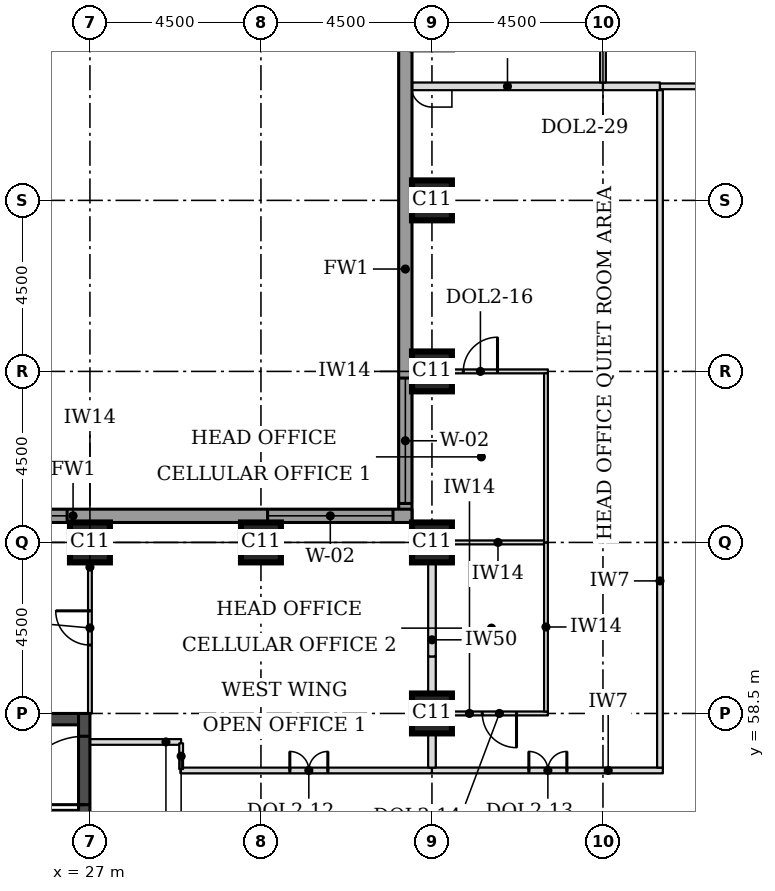
"""IFC4 building model, lengths in metres.
Left out: names, types, materials, properties, quantities, classifications, styles, units other than length and angle.
Written with IfcOpenShell. Run it as: python <this file> out.ifc"""

import sys

from ifc_helpers import new_model, si_unit, direction, frame, frame_2d, origin, origin_2d, place, context, subcontext, project, spatial, rectangle, extrude, element, fill, save


model = new_model("IFC4")
c1 = context("Model", 3, precision=1e-05, world=origin(), true_north=direction((0.0, 1.0)))
c2 = subcontext(c1, "Body", "Model", "MODEL_VIEW")
j1 = project(units=[si_unit("LENGTHUNIT", "METRE"), si_unit("PLANEANGLEUNIT", "RADIAN")], contexts=[c1])
p1 = place(None, origin())
s1 = spatial("IfcSite", under=j1, at=p1, CompositionType="ELEMENT")
p2 = place(p1, origin())
s2 = spatial("IfcBuilding", under=s1, at=p2, CompositionType="ELEMENT")
p3 = place(p2, frame((0.0, 0.0, 86.3)))
s3 = spatial("IfcBuildingStorey", under=s2, at=p3, CompositionType="ELEMENT", Elevation=86.3)
for number, where, z_axis, x_axis in (
    (1, (36.0, 58.5, 0.0), (0.0, 0.0, 1.0), (1.0, 0.0, 0.0)),
    (2, (27.0, 63.0, 0.0), (0.0, 0.0, 1.0), (1.0, 0.0, 0.0)),
    (3, (31.5, 63.0, 0.0), (0.0, 0.0, 1.0), (1.0, 0.0, 0.0)),
    (4, (36.0, 63.0, 0.0), (0.0, 0.0, 1.0), (1.0, 0.0, 0.0)),
    (5, (36.0, 67.5, 0.0), (0.0, 0.0, 1.0), (1.0, 0.0, 0.0)),
    (6, (36.0, 72.0, 0.0), (0.0, 0.0, 1.0), (1.0, 0.0, 0.0)),
):
    element("IfcColumn", number, at=place(p3, frame(where, z_axis=z_axis, x_axis=x_axis)), inside=s3, PredefinedType="COLUMN", context=c2, shape_type="SweptSolid", body=[
        extrude(rectangle(XDim=1.05, YDim=1.05, at=origin_2d()), origin(), (0.0, 0.0, 1.0), 3.7),
    ])
p4 = place(p3, frame((18.3, 58.35, 0.0), z_axis=(0.0, 0.0, 1.0), x_axis=(1.0, 0.0, 0.0)))
e7 = element("IfcWall", 7, at=p4, inside=s3, PredefinedType="SHEAR", context=c2, shape_type="SweptSolid", body=[
    extrude(rectangle(XDim=8.4, YDim=0.3, at=frame_2d((4.2, 0.0))), origin(), (0.0, 0.0, 1.0), 3.7),
])
p5 = place(p3, frame((26.85, 49.5, 0.0), z_axis=(0.0, 0.0, 1.0), x_axis=(0.0, 1.0, 0.0)))
e8 = element("IfcWall", 8, at=p5, inside=s3, PredefinedType="SHEAR", context=c2, shape_type="SweptSolid", body=[
    extrude(rectangle(XDim=9.0, YDim=0.3, at=frame_2d((4.5, 0.0))), origin(), (0.0, 0.0, 1.0), 3.7),
])
p6 = place(p5, frame((6.6, 0.0, 0.0)))
e9 = element("IfcOpeningElement", 9, at=p6, cuts=e8, PredefinedType="OPENING", context=c2, shape_type="SweptSolid", body=[
    extrude(rectangle(XDim=1.8, YDim=2.1, at=frame_2d((0.9, 1.05))), frame((0.0, 0.16, 0.0), z_axis=(0.0, -1.0, 0.0), x_axis=(1.0, 0.0, 0.0)), (0.0, 0.0, 1.0), 0.32),
])
p7 = place(p3, frame((35.3, 76.862, 0.0), z_axis=(0.0, 0.0, 1.0), x_axis=(0.0, -1.0, 0.0)))
e10 = element("IfcWall", 10, at=p7, inside=s3, PredefinedType="STANDARD", context=c2, shape_type="SweptSolid", body=[
    extrude(rectangle(XDim=13.337, YDim=0.35, at=frame_2d((6.669, 0.0))), origin(), (0.0, 0.0, 1.0), 3.525),
])
p8 = place(p7, frame((9.537, 0.0, 0.9)))
e11 = element("IfcOpeningElement", 11, at=p8, cuts=e10, PredefinedType="OPENING", context=c2, shape_type="SweptSolid", body=[
    extrude(rectangle(XDim=3.3, YDim=1.9, at=frame_2d((1.65, 0.95))), frame((0.0, 0.185, 0.0), z_axis=(0.0, -1.0, 0.0), x_axis=(1.0, 0.0, 0.0)), (0.0, 0.0, 1.0), 0.37),
])
p9 = place(p3, frame((35.475, 63.7, 0.0), z_axis=(0.0, 0.0, 1.0), x_axis=(-1.0, 0.0, 0.0)))
e12 = element("IfcWall", 12, at=p9, inside=s3, PredefinedType="STANDARD", context=c2, shape_type="SweptSolid", body=[
    extrude(rectangle(XDim=17.837, YDim=0.35, at=frame_2d((8.919, 0.0))), origin(), (0.0, 0.0, 1.0), 3.525),
])
p10 = place(p9, frame((0.5, 0.0, 0.9)))
e13 = element("IfcOpeningElement", 13, at=p10, cuts=e12, PredefinedType="OPENING", context=c2, shape_type="SweptSolid", body=[
    extrude(rectangle(XDim=3.3, YDim=1.9, at=frame_2d((1.65, 0.95))), frame((0.0, 0.185, 0.0), z_axis=(0.0, -1.0, 0.0), x_axis=(1.0, 0.0, 0.0)), (0.0, 0.0, 1.0), 0.37),
])
p11 = place(p9, frame((9.075, 0.0, 0.9)))
e14 = element("IfcOpeningElement", 14, at=p11, cuts=e12, PredefinedType="OPENING", context=c2, shape_type="SweptSolid", body=[
    extrude(rectangle(XDim=3.3, YDim=1.9, at=frame_2d((1.65, 0.95))), frame((0.0, 0.185, 0.0), z_axis=(0.0, -1.0, 0.0), x_axis=(1.0, 0.0, 0.0)), (0.0, 0.0, 1.0), 0.37),
])
p12 = place(p3, frame((29.38, 57.0, 0.0), z_axis=(0.0, 0.0, 1.0), x_axis=(1.0, 0.0, 0.0)))
e15 = element("IfcWall", 15, at=p12, inside=s3, PredefinedType="PARTITIONING", context=c2, shape_type="SweptSolid", body=[
    extrude(rectangle(XDim=6.62, YDim=0.15, at=frame_2d((3.31, 0.0))), origin(), (0.0, 0.0, 1.0), 3.55),
])
p13 = place(p12, frame((2.88, 0.0, 0.0)))
e16 = element("IfcOpeningElement", 16, at=p13, cuts=e15, PredefinedType="OPENING", context=c2, shape_type="SweptSolid", body=[
    extrude(rectangle(XDim=1.0, YDim=2.1, at=frame_2d((0.5, 1.05))), frame((0.0, 0.085, 0.0), z_axis=(0.0, -1.0, 0.0), x_axis=(1.0, 0.0, 0.0)), (0.0, 0.0, 1.0), 0.17),
])
p14 = place(p3, frame((36.0, 57.0, 0.0), z_axis=(0.0, 0.0, 1.0), x_axis=(1.0, 0.0, 0.0)))
e17 = element("IfcWall", 17, at=p14, inside=s3, PredefinedType="PARTITIONING", context=c2, shape_type="SweptSolid", body=[
    extrude(rectangle(XDim=6.075, YDim=0.15, at=frame_2d((3.038, 0.0))), origin(), (0.0, 0.0, 1.0), 3.55),
])
p15 = place(p14, frame((2.55, 0.0, 0.0)))
e18 = element("IfcOpeningElement", 18, at=p15, cuts=e17, PredefinedType="OPENING", context=c2, shape_type="SweptSolid", body=[
    extrude(rectangle(XDim=1.0, YDim=2.1, at=frame_2d((0.5, 1.05))), frame((0.0, 0.085, 0.0), z_axis=(0.0, -1.0, 0.0), x_axis=(1.0, 0.0, 0.0)), (0.0, 0.0, 1.0), 0.17),
])
p16 = place(p3, frame((36.525, 58.5, 0.0), z_axis=(0.0, 0.0, 1.0), x_axis=(1.0, 0.0, 0.0)))
e19 = element("IfcWall", 19, at=p16, inside=s3, PredefinedType="PARTITIONING", context=c2, shape_type="SweptSolid", body=[
    extrude(rectangle(XDim=2.525, YDim=0.1, at=frame_2d((1.263, 0.0))), origin(), (0.0, 0.0, 1.0), 3.55),
])
p17 = place(p16, frame((0.8, 0.0, 0.0)))
e20 = element("IfcOpeningElement", 20, at=p17, cuts=e19, PredefinedType="OPENING", context=c2, shape_type="SweptSolid", body=[
    extrude(rectangle(XDim=0.9, YDim=2.1, at=frame_2d((0.45, 1.05))), frame((0.0, 0.06, 0.0), z_axis=(0.0, -1.0, 0.0), x_axis=(1.0, 0.0, 0.0)), (0.0, 0.0, 1.0), 0.12),
])
p18 = place(p3, frame((36.525, 63.0, 0.0), z_axis=(0.0, 0.0, 1.0), x_axis=(1.0, 0.0, 0.0)))
e21 = element("IfcWall", 21, at=p18, inside=s3, PredefinedType="PARTITIONING", context=c2, shape_type="SweptSolid", body=[
    extrude(rectangle(XDim=2.425, YDim=0.1, at=frame_2d((1.212, 0.0))), origin(), (0.0, 0.0, 1.0), 3.55),
])
p19 = place(p3, frame((35.475, 67.5, 0.0), z_axis=(0.0, 0.0, 1.0), x_axis=(1.0, 0.0, 0.0)))
e22 = element("IfcWall", 22, at=p19, inside=s3, PredefinedType="PARTITIONING", context=c2, shape_type="SweptSolid", body=[
    extrude(rectangle(XDim=3.575, YDim=0.1, at=frame_2d((1.788, 0.0))), origin(), (0.0, 0.0, 1.0), 3.55),
])
p20 = place(p19, frame((1.35, 0.0, 0.0)))
e23 = element("IfcOpeningElement", 23, at=p20, cuts=e22, PredefinedType="OPENING", context=c2, shape_type="SweptSolid", body=[
    extrude(rectangle(XDim=0.9, YDim=2.1, at=frame_2d((0.45, 1.05))), frame((0.0, 0.06, 0.0), z_axis=(0.0, -1.0, 0.0), x_axis=(1.0, 0.0, 0.0)), (0.0, 0.0, 1.0), 0.12),
])
p21 = place(p3, frame((35.475, 75.0, 0.0), z_axis=(0.0, 0.0, 1.0), x_axis=(1.0, 0.0, 0.0)))
e24 = element("IfcWall", 24, at=p21, inside=s3, PredefinedType="PARTITIONING", context=c2, shape_type="SweptSolid", body=[
    extrude(rectangle(XDim=5.025, YDim=0.2, at=frame_2d((2.512, 0.0))), origin(), (0.0, 0.0, 1.0), 3.55),
])
p22 = place(p3, frame((40.5, 75.0, 0.0), z_axis=(0.0, 0.0, 1.0), x_axis=(1.0, 0.0, 0.0)))
e25 = element("IfcWall", 25, at=p22, inside=s3, PredefinedType="PARTITIONING", context=c2, shape_type="SweptSolid", body=[
    extrude(rectangle(XDim=1.5, YDim=0.2, at=frame_2d((0.75, 0.0))), origin(), (0.0, 0.0, 1.0), 3.55),
])
p23 = place(p3, frame((42.0, 75.0, 0.0), z_axis=(0.0, 0.0, 1.0), x_axis=(1.0, 0.0, 0.0)))
e26 = element("IfcWall", 26, at=p23, inside=s3, PredefinedType="PARTITIONING", context=c2, shape_type="SweptSolid", body=[
    extrude(rectangle(XDim=4.5, YDim=0.15, at=frame_2d((2.25, 0.0))), origin(), (0.0, 0.0, 1.0), 3.55),
])
p24 = place(p23, frame((1.75, 0.0, 0.0)))
e27 = element("IfcOpeningElement", 27, at=p24, cuts=e26, PredefinedType="OPENING", context=c2, shape_type="SweptSolid", body=[
    extrude(rectangle(XDim=1.0, YDim=2.1, at=frame_2d((0.5, 1.05))), frame((0.0, 0.085, 0.0), z_axis=(0.0, -1.0, 0.0), x_axis=(1.0, 0.0, 0.0)), (0.0, 0.0, 1.0), 0.17),
])
p25 = place(p3, frame((36.0, 57.075, 0.0), z_axis=(0.0, 0.0, 1.0), x_axis=(0.0, 1.0, 0.0)))
e28 = element("IfcWall", 28, at=p25, inside=s3, PredefinedType="PARTITIONING", context=c2, shape_type="SweptSolid", body=[
    extrude(rectangle(XDim=0.9, YDim=0.2, at=frame_2d((0.45, 0.0))), origin(), (0.0, 0.0, 1.0), 2.8),
])
p26 = place(p3, frame((42.0, 57.075, 0.0), z_axis=(0.0, 0.0, 1.0), x_axis=(0.0, 1.0, 0.0)))
e29 = element("IfcWall", 29, at=p26, inside=s3, PredefinedType="PARTITIONING", context=c2, shape_type="SweptSolid", body=[
    extrude(rectangle(XDim=17.825, YDim=0.15, at=frame_2d((8.913, 0.0))), origin(), (0.0, 0.0, 1.0), 3.55),
])
p27 = place(p3, frame((39.0, 58.55, 0.0), z_axis=(0.0, 0.0, 1.0), x_axis=(0.0, 1.0, 0.0)))
e30 = element("IfcWall", 30, at=p27, inside=s3, PredefinedType="PARTITIONING", context=c2, shape_type="SweptSolid", body=[
    extrude(rectangle(XDim=4.45, YDim=0.1, at=frame_2d((2.225, 0.0))), origin(), (0.0, 0.0, 1.0), 3.55),
])
p28 = place(p3, frame((36.0, 58.995, 0.0), z_axis=(0.0, 0.0, 1.0), x_axis=(0.0, 1.0, 0.0)))
e31 = element("IfcWall", 31, at=p28, inside=s3, PredefinedType="PARTITIONING", context=c2, shape_type="SweptSolid", body=[
    extrude(rectangle(XDim=1.005, YDim=0.2, at=frame_2d((0.502, 0.0))), origin(), (0.0, 0.0, 1.0), 2.8),
])
p29 = place(p3, frame((36.0, 60.0, 0.0), z_axis=(0.0, 0.0, 1.0), x_axis=(0.0, 1.0, 0.0)))
e32 = element("IfcWall", 32, at=p29, inside=s3, PredefinedType="PARTITIONING", context=c2, shape_type="SweptSolid", body=[
    extrude(rectangle(XDim=2.475, YDim=0.2, at=frame_2d((1.238, 0.0))), origin(), (0.0, 0.0, 1.0), 2.8),
])
p30 = place(p3, frame((39.0, 63.0, 0.0), z_axis=(0.0, 0.0, 1.0), x_axis=(0.0, 1.0, 0.0)))
e33 = element("IfcWall", 33, at=p30, inside=s3, PredefinedType="PARTITIONING", context=c2, shape_type="SweptSolid", body=[
    extrude(rectangle(XDim=4.45, YDim=0.1, at=frame_2d((2.225, 0.0))), origin(), (0.0, 0.0, 1.0), 3.55),
])
p31 = place(p3, frame((40.5, 75.1, 0.0), z_axis=(0.0, 0.0, 1.0), x_axis=(0.0, 1.0, 0.0)))
e34 = element("IfcWall", 34, at=p31, inside=s3, PredefinedType="PARTITIONING", context=c2, shape_type="SweptSolid", body=[
    extrude(rectangle(XDim=2.9, YDim=0.15, at=frame_2d((1.45, 0.0))), origin(), (0.0, 0.0, 1.0), 3.55),
])
p32 = place(p31, frame((1.0, 0.0, 0.0)))
e35 = element("IfcOpeningElement", 35, at=p32, cuts=e34, PredefinedType="OPENING", context=c2, shape_type="SweptSolid", body=[
    extrude(rectangle(XDim=0.9, YDim=2.1, at=frame_2d((0.45, 1.05))), frame((0.0, 0.085, 0.0), z_axis=(0.0, -1.0, 0.0), x_axis=(1.0, 0.0, 0.0)), (0.0, 0.0, 1.0), 0.17),
])
p33 = place(p3, frame((27.0, 63.0, 0.0), z_axis=(0.0, 0.0, 1.0), x_axis=(0.0, -1.0, 0.0)))
e36 = element("IfcWall", 36, at=p33, inside=s3, PredefinedType="PARTITIONING", context=c2, shape_type="SweptSolid", body=[
    extrude(rectangle(XDim=4.5, YDim=0.1, at=frame_2d((2.25, 0.0))), origin(), (0.0, 0.0, 1.0), 3.55),
])
p34 = place(p33, frame((1.8, 0.0, 0.0)))
e37 = element("IfcOpeningElement", 37, at=p34, cuts=e36, PredefinedType="OPENING", context=c2, shape_type="SweptSolid", body=[
    extrude(rectangle(XDim=0.9, YDim=2.1, at=frame_2d((0.45, 1.05))), frame((0.0, 0.06, 0.0), z_axis=(0.0, -1.0, 0.0), x_axis=(1.0, 0.0, 0.0)), (0.0, 0.0, 1.0), 0.12),
])
p35 = place(p3, frame((27.0, 57.75, 0.0), z_axis=(0.0, 0.0, 1.0), x_axis=(1.0, 0.0, 0.0)))
e38 = element("IfcWall", 38, at=p35, inside=s3, PredefinedType="PARTITIONING", context=c2, shape_type="SweptSolid", body=[
    extrude(rectangle(XDim=2.4, YDim=0.15, at=frame_2d((1.2, 0.0))), origin(), (0.0, 0.0, 1.0), 3.55),
])
p36 = place(p3, frame((29.4, 57.715, 0.0), z_axis=(0.0, 0.0, 1.0), x_axis=(0.0, -1.0, 0.0)))
e39 = element("IfcWall", 39, at=p36, inside=s3, PredefinedType="PARTITIONING", context=c2, shape_type="SweptSolid", body=[
    extrude(rectangle(XDim=0.68, YDim=0.1, at=frame_2d((0.34, 0.0))), origin(), (0.0, 0.0, 1.0), 3.55),
])
p37 = place(p3, frame((23.2, 55.85, 0.0), z_axis=(0.0, 0.0, 1.0), x_axis=(1.0, 0.0, 0.0)))
e40 = element("IfcWall", 40, at=p37, inside=s3, PredefinedType="SOLIDWALL", context=c2, shape_type="SweptSolid", body=[
    extrude(rectangle(XDim=3.5, YDim=0.2, at=frame_2d((1.75, 0.0))), origin(), (0.0, 0.0, 1.0), 3.55),
])
p38 = place(p37, frame((1.2, 0.0, 0.0)))
e41 = element("IfcOpeningElement", 41, at=p38, cuts=e40, PredefinedType="OPENING", context=c2, shape_type="SweptSolid", body=[
    extrude(rectangle(XDim=1.1, YDim=2.1, at=frame_2d((0.55, 1.05))), frame((0.0, 0.11, 0.0), z_axis=(0.0, -1.0, 0.0), x_axis=(1.0, 0.0, 0.0)), (0.0, 0.0, 1.0), 0.22),
])
p39 = place(p8, origin())
e42 = element("IfcWindow", 42, at=p39, inside=s3, PartitioningType="SINGLE_PANEL", PredefinedType="WINDOW", context=c2, shape_type="SweptSolid", body=[
    extrude(rectangle(XDim=3.3, YDim=1.9, at=frame_2d((1.65, 0.95))), frame((0.0, 0.085, 0.0), z_axis=(0.0, -1.0, 0.0), x_axis=(1.0, 0.0, 0.0)), (0.0, 0.0, 1.0), 0.06),
])
fill(e11, e42)
p40 = place(p10, origin())
e43 = element("IfcWindow", 43, at=p40, inside=s3, PartitioningType="SINGLE_PANEL", PredefinedType="WINDOW", context=c2, shape_type="SweptSolid", body=[
    extrude(rectangle(XDim=3.3, YDim=1.9, at=frame_2d((1.65, 0.95))), frame((0.0, 0.085, 0.0), z_axis=(0.0, -1.0, 0.0), x_axis=(1.0, 0.0, 0.0)), (0.0, 0.0, 1.0), 0.06),
])
fill(e13, e43)
p41 = place(p11, origin())
e44 = element("IfcWindow", 44, at=p41, inside=s3, PartitioningType="SINGLE_PANEL", PredefinedType="WINDOW", context=c2, shape_type="SweptSolid", body=[
    extrude(rectangle(XDim=3.3, YDim=1.9, at=frame_2d((1.65, 0.95))), frame((0.0, 0.085, 0.0), z_axis=(0.0, -1.0, 0.0), x_axis=(1.0, 0.0, 0.0)), (0.0, 0.0, 1.0), 0.06),
])
fill(e14, e44)
p42 = place(p15, origin())
e45 = element("IfcDoor", 45, at=p42, inside=s3, OperationType="DOUBLE_DOOR_SINGLE_SWING", PredefinedType="DOOR", context=c2, shape_type="SweptSolid", body=[
    extrude(rectangle(XDim=1.0, YDim=2.1, at=frame_2d((0.5, 1.05))), frame((0.0, 0.025, 0.0), z_axis=(0.0, -1.0, 0.0), x_axis=(1.0, 0.0, 0.0)), (0.0, 0.0, 1.0), 0.05),
])
fill(e18, e45)
p43 = place(p17, frame((0.9, 0.0, 0.0), z_axis=(0.0, 0.0, 1.0), x_axis=(-1.0, 0.0, 0.0)))
e46 = element("IfcDoor", 46, at=p43, inside=s3, OperationType="SINGLE_SWING_LEFT", PredefinedType="DOOR", context=c2, shape_type="SweptSolid", body=[
    extrude(rectangle(XDim=0.9, YDim=2.1, at=frame_2d((0.45, 1.05))), frame((0.0, 0.025, 0.0), z_axis=(0.0, -1.0, 0.0), x_axis=(1.0, 0.0, 0.0)), (0.0, 0.0, 1.0), 0.05),
])
fill(e20, e46)
p44 = place(p20, origin())
e47 = element("IfcDoor", 47, at=p44, inside=s3, OperationType="SINGLE_SWING_RIGHT", PredefinedType="DOOR", context=c2, shape_type="SweptSolid", body=[
    extrude(rectangle(XDim=0.9, YDim=2.1, at=frame_2d((0.45, 1.05))), frame((0.0, 0.025, 0.0), z_axis=(0.0, -1.0, 0.0), x_axis=(1.0, 0.0, 0.0)), (0.0, 0.0, 1.0), 0.05),
])
fill(e23, e47)
p45 = place(p13, origin())
e48 = element("IfcDoor", 48, at=p45, inside=s3, OperationType="DOUBLE_DOOR_SINGLE_SWING", PredefinedType="DOOR", context=c2, shape_type="SweptSolid", body=[
    extrude(rectangle(XDim=1.0, YDim=2.1, at=frame_2d((0.5, 1.05))), frame((0.0, 0.025, 0.0), z_axis=(0.0, -1.0, 0.0), x_axis=(1.0, 0.0, 0.0)), (0.0, 0.0, 1.0), 0.05),
])
fill(e16, e48)
p46 = place(p34, frame((0.9, 0.0, 0.0), z_axis=(0.0, 0.0, 1.0), x_axis=(-1.0, 0.0, 0.0)))
e49 = element("IfcDoor", 49, at=p46, inside=s3, OperationType="SINGLE_SWING_RIGHT", PredefinedType="DOOR", context=c2, shape_type="SweptSolid", body=[
    extrude(rectangle(XDim=0.9, YDim=2.1, at=frame_2d((0.45, 1.05))), frame((0.0, 0.025, 0.0), z_axis=(0.0, -1.0, 0.0), x_axis=(1.0, 0.0, 0.0)), (0.0, 0.0, 1.0), 0.05),
])
fill(e37, e49)
p47 = place(p6, origin())
e50 = element("IfcDoor", 50, at=p47, inside=s3, OperationType="SINGLE_SWING_LEFT", PredefinedType="DOOR", context=c2, shape_type="SweptSolid", body=[
    extrude(rectangle(XDim=1.8, YDim=2.1, at=frame_2d((0.9, 1.05))), frame((0.0, 0.025, 0.0), z_axis=(0.0, -1.0, 0.0), x_axis=(1.0, 0.0, 0.0)), (0.0, 0.0, 1.0), 0.05),
])
fill(e9, e50)
save(model, sys.argv[1])
